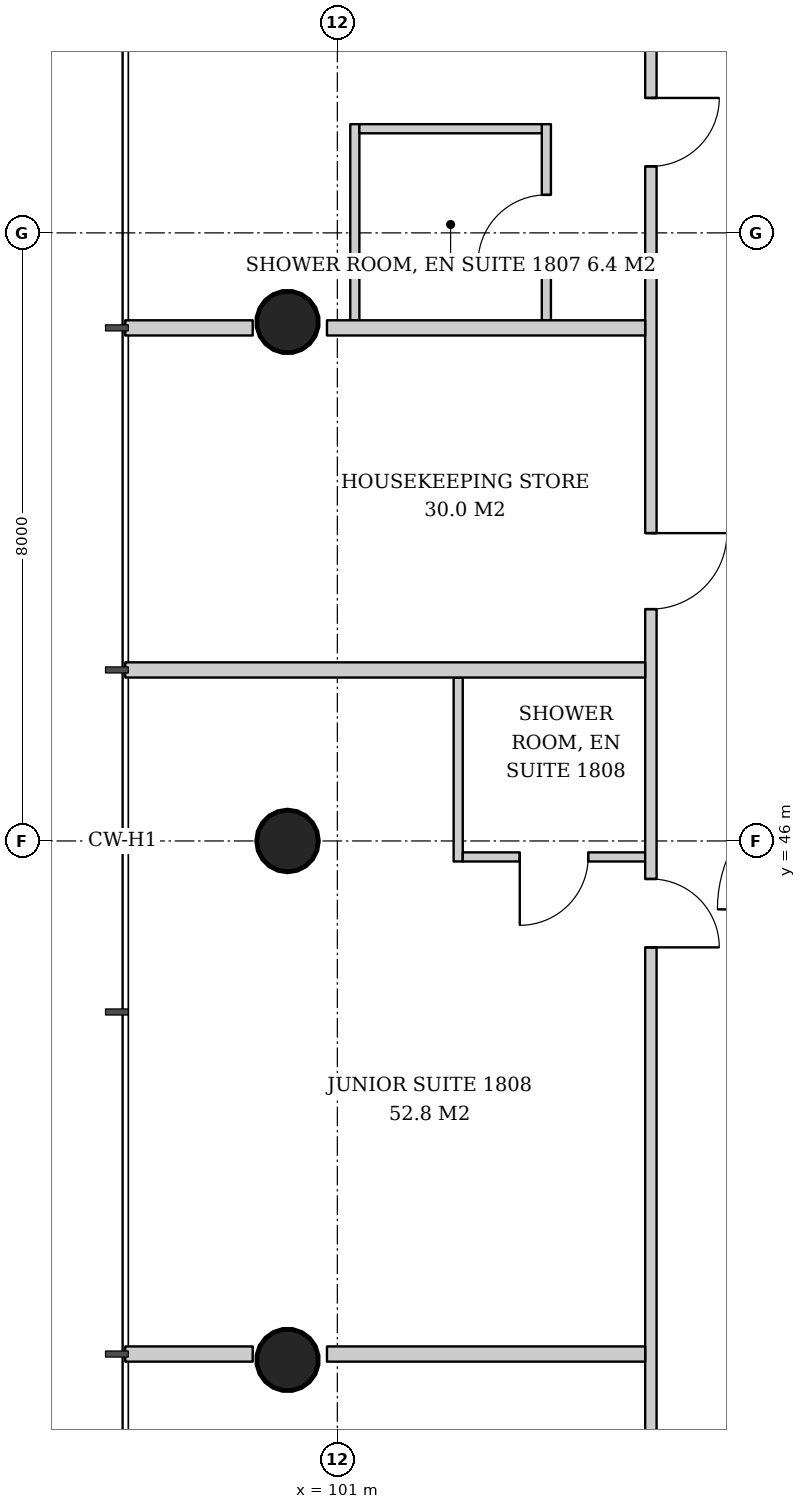
"""IFC4 building model, lengths in metres.
Left out: names, types, materials, properties, quantities, classifications, styles, units other than length and angle.
Written with IfcOpenShell. Run it as: python <this file> out.ifc"""

import sys

from ifc_helpers import new_model, si_unit, direction, frame, frame_2d, origin, origin_2d, place, context, subcontext, project, spatial, rectangle, hollow_circle, extrude, element, fill, save


model = new_model("IFC4")
c1 = context("Model", 3, precision=1e-05, world=origin(), true_north=direction((0.0, 1.0)))
c2 = subcontext(c1, "Body", "Model", "MODEL_VIEW")
j1 = project(units=[si_unit("LENGTHUNIT", "METRE"), si_unit("PLANEANGLEUNIT", "RADIAN")], contexts=[c1])
p1 = place(None, origin())
s1 = spatial("IfcSite", under=j1, at=p1, CompositionType="ELEMENT")
p2 = place(p1, origin())
s2 = spatial("IfcBuilding", under=s1, at=p2, CompositionType="ELEMENT")
p3 = place(p2, frame((0.0, 0.0, 74.2)))
s3 = spatial("IfcBuildingStorey", under=s2, at=p3, CompositionType="ELEMENT", Elevation=74.2)
p4 = place(p3, frame((100.293, 52.854, 0.0), z_axis=(0.042995471882, -0.021561908287, 0.998842566929), x_axis=(0.448280611873, 0.89389288677, 0.0)))
e1 = element("IfcColumn", 1, at=p4, inside=s3, PredefinedType="COLUMN", context=c2, shape_type="SweptSolid", body=[
    extrude(hollow_circle(Radius=0.406, WallThickness=0.03, at=origin_2d()), origin(), (0.0, 0.0, 1.0), 3.804),
])
p5 = place(p3, frame((100.293, 46.0, 0.0), z_axis=(0.043005470007, 0.0, 0.999074836811), x_axis=(0.0, 1.0, 0.0)))
e2 = element("IfcColumn", 2, at=p5, inside=s3, PredefinedType="COLUMN", context=c2, shape_type="SweptSolid", body=[
    extrude(hollow_circle(Radius=0.406, WallThickness=0.03, at=origin_2d()), origin(), (0.0, 0.0, 1.0), 3.803),
])
p6 = place(p3, frame((100.293, 39.146, 0.0), z_axis=(0.042995471882, 0.021561908287, 0.998842566929), x_axis=(-0.448280611873, 0.89389288677, 0.0)))
e3 = element("IfcColumn", 3, at=p6, inside=s3, PredefinedType="COLUMN", context=c2, shape_type="SweptSolid", body=[
    extrude(hollow_circle(Radius=0.406, WallThickness=0.03, at=origin_2d()), origin(), (0.0, 0.0, 1.0), 3.804),
])
p7 = place(p3, frame((103.75, 52.85, 0.0), z_axis=(0.0, 0.0, 1.0), x_axis=(0.0, 1.0, 0.0)))
e4 = element("IfcWall", 4, at=p7, inside=s3, PredefinedType="PARTITIONING", context=c2, shape_type="SweptSolid", body=[
    extrude(rectangle(XDim=2.58, YDim=0.12, at=frame_2d((1.29, 0.0))), origin(), (0.0, 0.0, 1.0), 2.8),
])
p8 = place(p7, frame((0.75, 0.0, 0.0)))
e5 = element("IfcOpeningElement", 5, at=p8, cuts=e4, PredefinedType="OPENING", context=c2, shape_type="SweptSolid", body=[
    extrude(rectangle(XDim=0.9, YDim=2.1, at=frame_2d((0.45, 1.05))), frame((0.0, 0.07, 0.0), z_axis=(0.0, -1.0, 0.0), x_axis=(1.0, 0.0, 0.0)), (0.0, 0.0, 1.0), 0.14),
])
p9 = place(p3, frame((101.23, 52.85, 0.0), z_axis=(0.0, 0.0, 1.0), x_axis=(0.0, 1.0, 0.0)))
e6 = element("IfcWall", 6, at=p9, inside=s3, PredefinedType="PARTITIONING", context=c2, shape_type="SweptSolid", body=[
    extrude(rectangle(XDim=2.58, YDim=0.12, at=frame_2d((1.29, 0.0))), origin(), (0.0, 0.0, 1.0), 2.8),
])
p10 = place(p3, frame((103.69, 55.37, 0.0), z_axis=(0.0, 0.0, 1.0), x_axis=(-1.0, 0.0, 0.0)))
e7 = element("IfcWall", 7, at=p10, inside=s3, PredefinedType="PARTITIONING", context=c2, shape_type="SweptSolid", body=[
    extrude(rectangle(XDim=2.4, YDim=0.12, at=frame_2d((1.2, 0.0))), origin(), (0.0, 0.0, 1.0), 2.8),
])
p11 = place(p3, frame((102.59, 48.15, 0.0), z_axis=(0.0, 0.0, 1.0), x_axis=(0.0, -1.0, 0.0)))
e8 = element("IfcWall", 8, at=p11, inside=s3, PredefinedType="PARTITIONING", context=c2, shape_type="SweptSolid", body=[
    extrude(rectangle(XDim=2.42, YDim=0.12, at=frame_2d((1.21, 0.0))), origin(), (0.0, 0.0, 1.0), 2.847),
])
p12 = place(p3, frame((105.05, 45.79, 0.0), z_axis=(0.0, 0.0, 1.0), x_axis=(-1.0, 0.0, 0.0)))
e9 = element("IfcWall", 9, at=p12, inside=s3, PredefinedType="PARTITIONING", context=c2, shape_type="SweptSolid", body=[
    extrude(rectangle(XDim=2.4, YDim=0.12, at=frame_2d((1.2, 0.0))), origin(), (0.0, 0.0, 1.0), 3.6),
])
p13 = place(p12, frame((0.75, 0.0, 0.0)))
e10 = element("IfcOpeningElement", 10, at=p13, cuts=e9, PredefinedType="OPENING", context=c2, shape_type="SweptSolid", body=[
    extrude(rectangle(XDim=0.9, YDim=2.1, at=frame_2d((0.45, 1.05))), frame((0.0, 0.07, 0.0), z_axis=(0.0, -1.0, 0.0), x_axis=(1.0, 0.0, 0.0)), (0.0, 0.0, 1.0), 0.14),
])
p14 = place(p3, frame((105.125, 57.95, 0.0), z_axis=(0.0, 0.0, 1.0), x_axis=(0.0, -1.0, 0.0)))
e11 = element("IfcWall", 11, at=p14, inside=s3, PredefinedType="PARTITIONING", context=c2, shape_type="SweptSolid", body=[
    extrude(rectangle(XDim=23.75, YDim=0.15, at=frame_2d((11.875, 0.0))), origin(), (0.0, 0.0, 1.0), 2.8),
])
p15 = place(p14, frame((2.175, 0.0, 0.0)))
e12 = element("IfcOpeningElement", 12, at=p15, cuts=e11, PredefinedType="OPENING", context=c2, shape_type="SweptSolid", body=[
    extrude(rectangle(XDim=0.9, YDim=2.1, at=frame_2d((0.45, 1.05))), frame((0.0, 0.085, 0.0), z_axis=(0.0, -1.0, 0.0), x_axis=(1.0, 0.0, 0.0)), (0.0, 0.0, 1.0), 0.17),
])
p16 = place(p14, frame((7.9, 0.0, 0.0)))
e13 = element("IfcOpeningElement", 13, at=p16, cuts=e11, PredefinedType="OPENING", context=c2, shape_type="SweptSolid", body=[
    extrude(rectangle(XDim=1.0, YDim=2.1, at=frame_2d((0.5, 1.05))), frame((0.0, 0.085, 0.0), z_axis=(0.0, -1.0, 0.0), x_axis=(1.0, 0.0, 0.0)), (0.0, 0.0, 1.0), 0.17),
])
p17 = place(p14, frame((12.45, 0.0, 0.0)))
e14 = element("IfcOpeningElement", 14, at=p17, cuts=e11, PredefinedType="OPENING", context=c2, shape_type="SweptSolid", body=[
    extrude(rectangle(XDim=0.9, YDim=2.1, at=frame_2d((0.45, 1.05))), frame((0.0, 0.085, 0.0), z_axis=(0.0, -1.0, 0.0), x_axis=(1.0, 0.0, 0.0)), (0.0, 0.0, 1.0), 0.17),
])
p18 = place(p3, frame((105.05, 52.75, 0.0), z_axis=(0.0, 0.0, 1.0), x_axis=(-1.0, 0.0, 0.0)))
e15 = element("IfcWall", 15, at=p18, inside=s3, PredefinedType="PARTITIONING", context=c2, shape_type="SweptSolid", body=[
    extrude(rectangle(XDim=4.187, YDim=0.2, at=frame_2d((2.093, 0.0))), origin(), (0.0, 0.0, 1.0), 3.6),
])
p19 = place(p3, frame((99.887, 52.75, 0.0), z_axis=(0.0, 0.0, 1.0), x_axis=(-1.0, 0.0, 0.0)))
e16 = element("IfcWall", 16, at=p19, inside=s3, PredefinedType="PARTITIONING", context=c2, shape_type="SweptSolid", body=[
    extrude(rectangle(XDim=1.677, YDim=0.2, at=frame_2d((0.838, 0.0))), origin(), (0.0, 0.0, 1.0), 3.6),
])
p20 = place(p3, frame((105.05, 48.25, 0.0), z_axis=(0.0, 0.0, 1.0), x_axis=(-1.0, 0.0, 0.0)))
e17 = element("IfcWall", 17, at=p20, inside=s3, PredefinedType="PARTITIONING", context=c2, shape_type="SweptSolid", body=[
    extrude(rectangle(XDim=6.84, YDim=0.2, at=frame_2d((3.42, 0.0))), origin(), (0.0, 0.0, 1.0), 3.05),
])
p21 = place(p3, frame((105.05, 39.25, 0.0), z_axis=(0.0, 0.0, 1.0), x_axis=(-1.0, 0.0, 0.0)))
e18 = element("IfcWall", 18, at=p21, inside=s3, PredefinedType="PARTITIONING", context=c2, shape_type="SweptSolid", body=[
    extrude(rectangle(XDim=4.187, YDim=0.2, at=frame_2d((2.093, 0.0))), origin(), (0.0, 0.0, 1.0), 3.6),
])
p22 = place(p3, frame((99.887, 39.25, 0.0), z_axis=(0.0, 0.0, 1.0), x_axis=(-1.0, 0.0, 0.0)))
e19 = element("IfcWall", 19, at=p22, inside=s3, PredefinedType="PARTITIONING", context=c2, shape_type="SweptSolid", body=[
    extrude(rectangle(XDim=1.677, YDim=0.2, at=frame_2d((0.838, 0.0))), origin(), (0.0, 0.0, 1.0), 3.6),
])
p23 = place(p8, origin())
e20 = element("IfcDoor", 20, at=p23, inside=s3, OperationType="SINGLE_SWING_LEFT", PredefinedType="DOOR", context=c2, shape_type="SweptSolid", body=[
    extrude(rectangle(XDim=0.9, YDim=2.1, at=frame_2d((0.45, 1.05))), frame((0.0, 0.025, 0.0), z_axis=(0.0, -1.0, 0.0), x_axis=(1.0, 0.0, 0.0)), (0.0, 0.0, 1.0), 0.05),
])
fill(e5, e20)
p24 = place(p13, origin())
e21 = element("IfcDoor", 21, at=p24, inside=s3, OperationType="SINGLE_SWING_RIGHT", PredefinedType="DOOR", context=c2, shape_type="SweptSolid", body=[
    extrude(rectangle(XDim=0.9, YDim=2.1, at=frame_2d((0.45, 1.05))), frame((0.0, 0.025, 0.0), z_axis=(0.0, -1.0, 0.0), x_axis=(1.0, 0.0, 0.0)), (0.0, 0.0, 1.0), 0.05),
])
fill(e10, e21)
p25 = place(p15, origin())
e22 = element("IfcDoor", 22, at=p25, inside=s3, OperationType="SINGLE_SWING_LEFT", PredefinedType="DOOR", context=c2, shape_type="SweptSolid", body=[
    extrude(rectangle(XDim=0.9, YDim=2.1, at=frame_2d((0.45, 1.05))), frame((0.0, 0.025, 0.0), z_axis=(0.0, -1.0, 0.0), x_axis=(1.0, 0.0, 0.0)), (0.0, 0.0, 1.0), 0.05),
])
fill(e12, e22)
p26 = place(p16, origin())
e23 = element("IfcDoor", 23, at=p26, inside=s3, OperationType="SINGLE_SWING_LEFT", PredefinedType="DOOR", context=c2, shape_type="SweptSolid", body=[
    extrude(rectangle(XDim=1.0, YDim=2.1, at=frame_2d((0.5, 1.05))), frame((0.0, 0.025, 0.0), z_axis=(0.0, -1.0, 0.0), x_axis=(1.0, 0.0, 0.0)), (0.0, 0.0, 1.0), 0.05),
])
fill(e13, e23)
p27 = place(p17, origin())
e24 = element("IfcDoor", 24, at=p27, inside=s3, OperationType="SINGLE_SWING_RIGHT", PredefinedType="DOOR", context=c2, shape_type="SweptSolid", body=[
    extrude(rectangle(XDim=0.9, YDim=2.1, at=frame_2d((0.45, 1.05))), frame((0.0, 0.025, 0.0), z_axis=(0.0, -1.0, 0.0), x_axis=(1.0, 0.0, 0.0)), (0.0, 0.0, 1.0), 0.05),
])
fill(e14, e24)
save(model, sys.argv[1])
